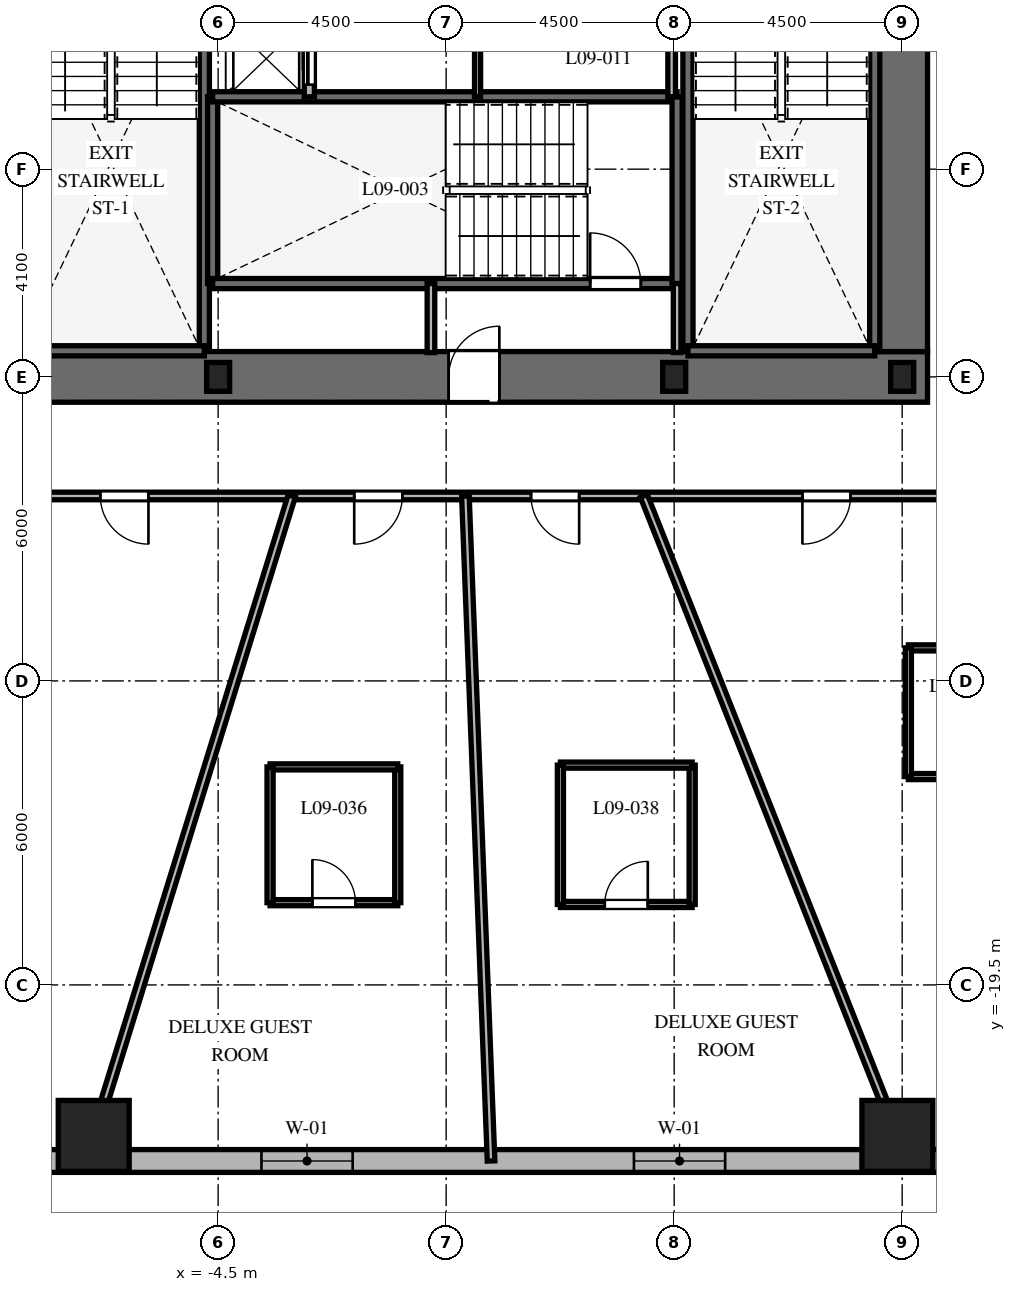
"""IFC4 building model, lengths in metres.
Left out: names, types, materials, properties, quantities, classifications, styles, units other than length and angle.
Written with IfcOpenShell. Run it as: python <this file> out.ifc"""

import sys

from ifc_helpers import new_model, si_unit, direction, frame, frame_2d, origin, origin_2d, place, context, subcontext, project, spatial, rectangle, i_section, extrude, element, fill, save


model = new_model("IFC4")
c1 = context("Model", 3, precision=1e-05, world=origin(), true_north=direction((0.0, 1.0)))
c2 = subcontext(c1, "Body", "Model", "MODEL_VIEW")
j1 = project(units=[si_unit("LENGTHUNIT", "METRE"), si_unit("PLANEANGLEUNIT", "RADIAN")], contexts=[c1])
p1 = place(None, origin())
s1 = spatial("IfcSite", under=j1, at=p1, CompositionType="ELEMENT")
p2 = place(p1, origin())
s2 = spatial("IfcBuilding", under=s1, at=p2, CompositionType="ELEMENT")
p3 = place(p2, frame((0.0, 0.0, 45.3)))
s3 = spatial("IfcBuildingStorey", under=s2, at=p3, CompositionType="ELEMENT", Elevation=45.3)
p4 = place(p3, frame((-9.5, -7.5, 0.0), z_axis=(0.0, 0.0, 1.0), x_axis=(1.0, 0.0, 0.0)))
e1 = element("IfcWall", 1, at=p4, inside=s3, PredefinedType="SHEAR", context=c2, shape_type="SweptSolid", body=[
    extrude(rectangle(XDim=19.0, YDim=1.0, at=frame_2d((9.5, 0.0))), origin(), (0.0, 0.0, 1.0), 3.7),
])
p5 = place(p4, frame((9.55, 0.0, 0.0)))
e2 = element("IfcOpeningElement", 2, at=p5, cuts=e1, PredefinedType="OPENING", context=c2, shape_type="SweptSolid", body=[
    extrude(rectangle(XDim=1.0, YDim=2.15, at=frame_2d((0.5, 1.075))), frame((0.0, 0.51, 0.0), z_axis=(0.0, -1.0, 0.0), x_axis=(1.0, 0.0, 0.0)), (0.0, 0.0, 1.0), 1.02),
])
p6 = place(p3, frame((9.0, -7.0, 0.0), z_axis=(0.0, 0.0, 1.0), x_axis=(0.0, 1.0, 0.0)))
e3 = element("IfcWall", 3, at=p6, inside=s3, PredefinedType="SHEAR", context=c2, shape_type="SweptSolid", body=[
    extrude(rectangle(XDim=14.0, YDim=1.0, at=frame_2d((7.0, 0.0))), origin(), (0.0, 0.0, 1.0), 3.7),
])
p7 = place(p6, frame((10.125, 0.0, 0.0)))
e4 = element("IfcOpeningElement", 4, at=p7, cuts=e3, PredefinedType="OPENING", context=c2, shape_type="SweptSolid", body=[
    extrude(rectangle(XDim=1.05, YDim=2.15, at=frame_2d((0.525, 1.075))), frame((0.0, 0.51, 0.0), z_axis=(0.0, -1.0, 0.0), x_axis=(1.0, 0.0, 0.0)), (0.0, 0.0, 1.0), 1.02),
])
p8 = place(p3, frame((-4.772, -6.985, 0.0), z_axis=(0.0, 0.0, 1.0), x_axis=(0.0, 1.0, 0.0)))
e5 = element("IfcWall", 5, at=p8, inside=s3, PredefinedType="SHEAR", context=c2, shape_type="SweptSolid", body=[
    extrude(rectangle(XDim=9.143, YDim=0.2, at=frame_2d((4.572, 0.0))), origin(), (0.0, 0.0, 1.0), 3.7),
])
p9 = place(p3, frame((-8.458, -6.985, 0.0), z_axis=(0.0, 0.0, 1.0), x_axis=(1.0, 0.0, 0.0)))
e6 = element("IfcWall", 6, at=p9, inside=s3, PredefinedType="SHEAR", context=c2, shape_type="SweptSolid", body=[
    extrude(rectangle(XDim=3.686, YDim=0.2, at=frame_2d((1.843, 0.0))), origin(), (0.0, 0.0, 1.0), 3.7),
])
for number, where, z_axis, x_axis in (
    (7, (4.772, -6.985, 0.0), (0.0, 0.0, 1.0), (0.0, 1.0, 0.0)),
    (8, (8.458, -6.985, 0.0), (0.0, 0.0, 1.0), (0.0, 1.0, 0.0)),
):
    element("IfcWall", number, at=place(p3, frame(where, z_axis=z_axis, x_axis=x_axis)), inside=s3, PredefinedType="SHEAR", context=c2, shape_type="SweptSolid", body=[
        extrude(rectangle(XDim=9.143, YDim=0.2, at=frame_2d((4.572, 0.0))), origin(), (0.0, 0.0, 1.0), 3.7),
    ])
for number, where, z_axis, x_axis in (
    (9, (4.772, -6.985, 0.0), (0.0, 0.0, 1.0), (1.0, 0.0, 0.0)),
    (10, (-4.608, -5.658, 0.0), (0.0, 0.0, 1.0), (0.0, 1.0, 0.0)),
):
    element("IfcWall", number, at=place(p3, frame(where, z_axis=z_axis, x_axis=x_axis)), inside=s3, PredefinedType="SHEAR", context=c2, shape_type="SweptSolid", body=[
        extrude(rectangle(XDim=3.686, YDim=0.2, at=frame_2d((1.843, 0.0))), origin(), (0.0, 0.0, 1.0), 3.7),
    ])
p10 = place(p3, frame((-4.608, -5.658, 0.0), z_axis=(0.0, 0.0, 1.0), x_axis=(1.0, 0.0, 0.0)))
e11 = element("IfcWall", 11, at=p10, inside=s3, PredefinedType="SHEAR", context=c2, shape_type="SweptSolid", body=[
    extrude(rectangle(XDim=9.166, YDim=0.2, at=frame_2d((4.583, 0.0))), origin(), (0.0, 0.0, 1.0), 3.7),
])
p11 = place(p10, frame((7.45, 0.0, 0.0)))
e12 = element("IfcOpeningElement", 12, at=p11, cuts=e11, PredefinedType="OPENING", context=c2, shape_type="SweptSolid", body=[
    extrude(rectangle(XDim=1.0, YDim=2.15, at=frame_2d((0.5, 1.075))), frame((0.0, 0.11, 0.0), z_axis=(0.0, -1.0, 0.0), x_axis=(1.0, 0.0, 0.0)), (0.0, 0.0, 1.0), 0.22),
])
p12 = place(p3, frame((-4.608, -1.972, 0.0), z_axis=(0.0, 0.0, 1.0), x_axis=(1.0, 0.0, 0.0)))
e13 = element("IfcWall", 13, at=p12, inside=s3, PredefinedType="SHEAR", context=c2, shape_type="SweptSolid", body=[
    extrude(rectangle(XDim=9.166, YDim=0.2, at=frame_2d((4.583, 0.0))), origin(), (0.0, 0.0, 1.0), 3.7),
])
p13 = place(p3, frame((4.558, -5.658, 0.0), z_axis=(0.0, 0.0, 1.0), x_axis=(0.0, 1.0, 0.0)))
e14 = element("IfcWall", 14, at=p13, inside=s3, PredefinedType="SHEAR", context=c2, shape_type="SweptSolid", body=[
    extrude(rectangle(XDim=3.686, YDim=0.2, at=frame_2d((1.843, 0.0))), origin(), (0.0, 0.0, 1.0), 3.7),
])
for number, where, z_axis, x_axis in (
    (15, (-4.5, -7.5, 0.0), (0.0, 0.0, 1.0), (1.0, 0.0, 0.0)),
    (16, (4.5, -7.5, 0.0), (0.0, 0.0, 1.0), (1.0, 0.0, 0.0)),
    (17, (9.0, -7.5, 0.0), (0.0, 0.0, 1.0), (1.0, 0.0, 0.0)),
):
    element("IfcColumn", number, at=place(p3, frame(where, z_axis=z_axis, x_axis=x_axis)), inside=s3, PredefinedType="COLUMN", context=c2, shape_type="SweptSolid", body=[
        extrude(i_section(OverallWidth=0.454, OverallDepth=0.569, WebThickness=0.078, FlangeThickness=0.125, at=origin_2d()), origin(), (0.0, 0.0, 1.0), 3.7),
    ])
for number, where, z_axis, x_axis in (
    (18, (-6.955, -22.48, 0.0), (0.0, 0.0, 1.0), (1.0, 0.0, 0.0)),
    (19, (8.905, -22.48, 0.0), (0.0, 0.0, 1.0), (1.0, 0.0, 0.0)),
):
    element("IfcColumn", number, at=place(p3, frame(where, z_axis=z_axis, x_axis=x_axis)), inside=s3, PredefinedType="COLUMN", context=c2, shape_type="SweptSolid", body=[
        extrude(rectangle(XDim=1.4, YDim=1.4, at=origin_2d()), origin(), (0.0, 0.0, 1.0), 3.7),
    ])
p14 = place(p3, frame((-12.221, -22.975, 0.0), z_axis=(0.0, 0.0, 1.0), x_axis=(1.0, 0.0, 0.0)))
e20 = element("IfcWall", 20, at=p14, inside=s3, PredefinedType="SOLIDWALL", context=c2, shape_type="SweptSolid", body=[
    extrude(rectangle(XDim=26.389, YDim=0.45, at=frame_2d((13.195, 0.0))), origin(), (0.0, 0.0, 1.0), 3.4),
])
p15 = place(p14, frame((1.653, 0.0, 0.8)))
e21 = element("IfcOpeningElement", 21, at=p15, cuts=e20, PredefinedType="OPENING", context=c2, shape_type="SweptSolid", body=[
    extrude(rectangle(XDim=1.8, YDim=1.8, at=frame_2d((0.9, 0.9))), frame((0.0, 0.235, 0.0), z_axis=(0.0, -1.0, 0.0), x_axis=(1.0, 0.0, 0.0)), (0.0, 0.0, 1.0), 0.47),
])
p16 = place(p14, frame((8.576, 0.0, 0.8)))
e22 = element("IfcOpeningElement", 22, at=p16, cuts=e20, PredefinedType="OPENING", context=c2, shape_type="SweptSolid", body=[
    extrude(rectangle(XDim=1.8, YDim=1.8, at=frame_2d((0.9, 0.9))), frame((0.0, 0.235, 0.0), z_axis=(0.0, -1.0, 0.0), x_axis=(1.0, 0.0, 0.0)), (0.0, 0.0, 1.0), 0.47),
])
p17 = place(p14, frame((15.927, 0.0, 0.8)))
e23 = element("IfcOpeningElement", 23, at=p17, cuts=e20, PredefinedType="OPENING", context=c2, shape_type="SweptSolid", body=[
    extrude(rectangle(XDim=1.8, YDim=1.8, at=frame_2d((0.9, 0.9))), frame((0.0, 0.235, 0.0), z_axis=(0.0, -1.0, 0.0), x_axis=(1.0, 0.0, 0.0)), (0.0, 0.0, 1.0), 0.47),
])
p18 = place(p14, frame((22.938, 0.0, 0.8)))
e24 = element("IfcOpeningElement", 24, at=p18, cuts=e20, PredefinedType="OPENING", context=c2, shape_type="SweptSolid", body=[
    extrude(rectangle(XDim=1.8, YDim=1.8, at=frame_2d((0.9, 0.9))), frame((0.0, 0.235, 0.0), z_axis=(0.0, -1.0, 0.0), x_axis=(1.0, 0.0, 0.0)), (0.0, 0.0, 1.0), 0.47),
])
for number, where, z_axis, x_axis in (
    (25, (-0.3, -7.02, 0.0), (0.0, 0.0, 1.0), (0.0, 1.0, 0.0)),
    (26, (4.558, -7.02, 0.0), (0.0, 0.0, 1.0), (0.0, 1.0, 0.0)),
):
    element("IfcWall", number, at=place(p3, frame(where, z_axis=z_axis, x_axis=x_axis)), inside=s3, PredefinedType="PARTITIONING", context=c2, shape_type="SweptSolid", body=[
        extrude(rectangle(XDim=1.362, YDim=0.15, at=frame_2d((0.681, 0.0))), origin(), (0.0, 0.0, 1.0), 3.4),
    ])
p19 = place(p3, frame((-2.7, -1.972, 0.0), z_axis=(0.0, 0.0, 1.0), x_axis=(0.0, 1.0, 0.0)))
e27 = element("IfcWall", 27, at=p19, inside=s3, PredefinedType="PARTITIONING", context=c2, shape_type="SweptSolid", body=[
    extrude(rectangle(XDim=1.472, YDim=0.2, at=frame_2d((0.736, 0.0))), origin(), (0.0, 0.0, 1.0), 3.4),
])
p20 = place(p19, frame((0.24, 0.0, 0.0)))
e28 = element("IfcOpeningElement", 28, at=p20, cuts=e27, PredefinedType="OPENING", context=c2, shape_type="SweptSolid", body=[
    extrude(rectangle(XDim=1.0, YDim=2.2, at=frame_2d((0.5, 1.1))), frame((0.0, 0.11, 0.0), z_axis=(0.0, -1.0, 0.0), x_axis=(1.0, 0.0, 0.0)), (0.0, 0.0, 1.0), 0.22),
])
p21 = place(p3, frame((4.45, -1.972, 0.0), z_axis=(0.0, 0.0, 1.0), x_axis=(0.0, 1.0, 0.0)))
e29 = element("IfcWall", 29, at=p21, inside=s3, PredefinedType="PARTITIONING", context=c2, shape_type="SweptSolid", body=[
    extrude(rectangle(XDim=4.222, YDim=0.15, at=frame_2d((2.111, 0.0))), origin(), (0.0, 0.0, 1.0), 3.4),
])
p22 = place(p3, frame((0.62, -1.972, 0.0), z_axis=(0.0, 0.0, 1.0), x_axis=(0.0, 1.0, 0.0)))
e30 = element("IfcWall", 30, at=p22, inside=s3, PredefinedType="PARTITIONING", context=c2, shape_type="SweptSolid", body=[
    extrude(rectangle(XDim=1.472, YDim=0.12, at=frame_2d((0.736, 0.0))), origin(), (0.0, 0.0, 1.0), 3.4),
])
p23 = place(p3, frame((11.35, -9.85, 0.0), z_axis=(0.0, 0.0, 1.0), x_axis=(-1.0, 0.0, 0.0)))
e31 = element("IfcWall", 31, at=p23, inside=s3, PredefinedType="PARTITIONING", context=c2, shape_type="SweptSolid", body=[
    extrude(rectangle(XDim=22.7, YDim=0.15, at=frame_2d((11.35, 0.0))), origin(), (0.0, 0.0, 1.0), 2.84),
])
p24 = place(p23, frame((17.225, 0.0, 0.0)))
e32 = element("IfcOpeningElement", 32, at=p24, cuts=e31, PredefinedType="OPENING", context=c2, shape_type="SweptSolid", body=[
    extrude(rectangle(XDim=0.95, YDim=2.03, at=frame_2d((0.475, 1.015))), frame((0.0, 0.085, 0.0), z_axis=(0.0, -1.0, 0.0), x_axis=(1.0, 0.0, 0.0)), (0.0, 0.0, 1.0), 0.17),
])
p25 = place(p23, frame((12.214, 0.0, 0.0)))
e33 = element("IfcOpeningElement", 33, at=p25, cuts=e31, PredefinedType="OPENING", context=c2, shape_type="SweptSolid", body=[
    extrude(rectangle(XDim=0.95, YDim=2.03, at=frame_2d((0.475, 1.015))), frame((0.0, 0.085, 0.0), z_axis=(0.0, -1.0, 0.0), x_axis=(1.0, 0.0, 0.0)), (0.0, 0.0, 1.0), 0.17),
])
p26 = place(p23, frame((8.725, 0.0, 0.0)))
e34 = element("IfcOpeningElement", 34, at=p26, cuts=e31, PredefinedType="OPENING", context=c2, shape_type="SweptSolid", body=[
    extrude(rectangle(XDim=0.95, YDim=2.03, at=frame_2d((0.475, 1.015))), frame((0.0, 0.085, 0.0), z_axis=(0.0, -1.0, 0.0), x_axis=(1.0, 0.0, 0.0)), (0.0, 0.0, 1.0), 0.17),
])
p27 = place(p23, frame((3.369, 0.0, 0.0)))
e35 = element("IfcOpeningElement", 35, at=p27, cuts=e31, PredefinedType="OPENING", context=c2, shape_type="SweptSolid", body=[
    extrude(rectangle(XDim=0.95, YDim=2.03, at=frame_2d((0.475, 1.015))), frame((0.0, 0.085, 0.0), z_axis=(0.0, -1.0, 0.0), x_axis=(1.0, 0.0, 0.0)), (0.0, 0.0, 1.0), 0.17),
])
p28 = place(p3, frame((-3.048, -9.85, 0.0), z_axis=(0.0, 0.0, 1.0), x_axis=(-0.295553992761, -0.955326037206, 0.0)))
e36 = element("IfcWall", 36, at=p28, inside=s3, PredefinedType="PARTITIONING", context=c2, shape_type="SweptSolid", body=[
    extrude(rectangle(XDim=13.739, YDim=0.15, at=frame_2d((6.869, 0.0))), origin(), (0.0, 0.0, 1.0), 2.54),
])
p29 = place(p3, frame((0.38, -9.85, 0.0), z_axis=(0.0, 0.0, 1.0), x_axis=(0.038568751747, -0.999255948888, 0.0)))
e37 = element("IfcWall", 37, at=p29, inside=s3, PredefinedType="PARTITIONING", context=c2, shape_type="SweptSolid", body=[
    extrude(rectangle(XDim=13.135, YDim=0.15, at=frame_2d((6.567, 0.0))), origin(), (0.0, 0.0, 1.0), 2.54),
])
p30 = place(p3, frame((3.902, -9.85, 0.0), z_axis=(0.0, 0.0, 1.0), x_axis=(0.36828765711, -0.929711891728, 0.0)))
e38 = element("IfcWall", 38, at=p30, inside=s3, PredefinedType="PARTITIONING", context=c2, shape_type="SweptSolid", body=[
    extrude(rectangle(XDim=14.117, YDim=0.15, at=frame_2d((7.059, 0.0))), origin(), (0.0, 0.0, 1.0), 2.54),
])
p31 = place(p3, frame((-3.475, -17.877, 0.0), z_axis=(0.0, 0.0, 1.0), x_axis=(1.0, 0.0, 0.0)))
e39 = element("IfcWall", 39, at=p31, inside=s3, PredefinedType="PARTITIONING", context=c2, shape_type="SweptSolid", body=[
    extrude(rectangle(XDim=2.52, YDim=0.12, at=frame_2d((1.26, 0.0))), origin(), (0.0, 0.0, 1.0), 2.84),
])
p32 = place(p31, frame((0.835, 0.0, 0.0)))
e40 = element("IfcOpeningElement", 40, at=p32, cuts=e39, PredefinedType="OPENING", context=c2, shape_type="SweptSolid", body=[
    extrude(rectangle(XDim=0.85, YDim=2.03, at=frame_2d((0.425, 1.015))), frame((0.0, 0.07, 0.0), z_axis=(0.0, -1.0, 0.0), x_axis=(1.0, 0.0, 0.0)), (0.0, 0.0, 1.0), 0.14),
])
p33 = place(p3, frame((-0.955, -17.877, 0.0), z_axis=(0.0, 0.0, 1.0), x_axis=(0.0, 1.0, 0.0)))
e41 = element("IfcWall", 41, at=p33, inside=s3, PredefinedType="PARTITIONING", context=c2, shape_type="SweptSolid", body=[
    extrude(rectangle(XDim=2.68, YDim=0.12, at=frame_2d((1.34, 0.0))), origin(), (0.0, 0.0, 1.0), 2.84),
])
p34 = place(p3, frame((-0.955, -15.197, 0.0), z_axis=(0.0, 0.0, 1.0), x_axis=(-1.0, 0.0, 0.0)))
e42 = element("IfcWall", 42, at=p34, inside=s3, PredefinedType="PARTITIONING", context=c2, shape_type="SweptSolid", body=[
    extrude(rectangle(XDim=2.52, YDim=0.12, at=frame_2d((1.26, 0.0))), origin(), (0.0, 0.0, 1.0), 3.4),
])
p35 = place(p3, frame((-3.475, -15.197, 0.0), z_axis=(0.0, 0.0, 1.0), x_axis=(0.0, -1.0, 0.0)))
e43 = element("IfcWall", 43, at=p35, inside=s3, PredefinedType="PARTITIONING", context=c2, shape_type="SweptSolid", body=[
    extrude(rectangle(XDim=2.68, YDim=0.12, at=frame_2d((1.34, 0.0))), origin(), (0.0, 0.0, 1.0), 2.84),
])
p36 = place(p3, frame((2.255, -17.912, 0.0), z_axis=(0.0, 0.0, 1.0), x_axis=(1.0, 0.0, 0.0)))
e44 = element("IfcWall", 44, at=p36, inside=s3, PredefinedType="PARTITIONING", context=c2, shape_type="SweptSolid", body=[
    extrude(rectangle(XDim=2.6, YDim=0.12, at=frame_2d((1.3, 0.0))), origin(), (0.0, 0.0, 1.0), 3.4),
])
p37 = place(p36, frame((0.875, 0.0, 0.0)))
e45 = element("IfcOpeningElement", 45, at=p37, cuts=e44, PredefinedType="OPENING", context=c2, shape_type="SweptSolid", body=[
    extrude(rectangle(XDim=0.85, YDim=2.03, at=frame_2d((0.425, 1.015))), frame((0.0, 0.07, 0.0), z_axis=(0.0, -1.0, 0.0), x_axis=(1.0, 0.0, 0.0)), (0.0, 0.0, 1.0), 0.14),
])
p38 = place(p3, frame((4.855, -17.912, 0.0), z_axis=(0.0, 0.0, 1.0), x_axis=(0.0, 1.0, 0.0)))
e46 = element("IfcWall", 46, at=p38, inside=s3, PredefinedType="PARTITIONING", context=c2, shape_type="SweptSolid", body=[
    extrude(rectangle(XDim=2.75, YDim=0.12, at=frame_2d((1.375, 0.0))), origin(), (0.0, 0.0, 1.0), 2.84),
])
p39 = place(p3, frame((4.855, -15.162, 0.0), z_axis=(0.0, 0.0, 1.0), x_axis=(-1.0, 0.0, 0.0)))
e47 = element("IfcWall", 47, at=p39, inside=s3, PredefinedType="PARTITIONING", context=c2, shape_type="SweptSolid", body=[
    extrude(rectangle(XDim=2.6, YDim=0.12, at=frame_2d((1.3, 0.0))), origin(), (0.0, 0.0, 1.0), 3.4),
])
p40 = place(p3, frame((2.255, -15.162, 0.0), z_axis=(0.0, 0.0, 1.0), x_axis=(0.0, -1.0, 0.0)))
e48 = element("IfcWall", 48, at=p40, inside=s3, PredefinedType="PARTITIONING", context=c2, shape_type="SweptSolid", body=[
    extrude(rectangle(XDim=2.75, YDim=0.12, at=frame_2d((1.375, 0.0))), origin(), (0.0, 0.0, 1.0), 2.84),
])
p41 = place(p3, frame((9.122, -15.388, 0.0), z_axis=(0.0, 0.0, 1.0), x_axis=(1.0, 0.0, 0.0)))
e49 = element("IfcWall", 49, at=p41, inside=s3, PredefinedType="PARTITIONING", context=c2, shape_type="SweptSolid", body=[
    extrude(rectangle(XDim=2.68, YDim=0.12, at=frame_2d((1.34, 0.0))), origin(), (0.0, 0.0, 1.0), 3.4),
])
p42 = place(p41, frame((0.915, 0.0, 0.0)))
e50 = element("IfcOpeningElement", 50, at=p42, cuts=e49, PredefinedType="OPENING", context=c2, shape_type="SweptSolid", body=[
    extrude(rectangle(XDim=0.85, YDim=2.03, at=frame_2d((0.425, 1.015))), frame((0.0, 0.07, 0.0), z_axis=(0.0, -1.0, 0.0), x_axis=(1.0, 0.0, 0.0)), (0.0, 0.0, 1.0), 0.14),
])
p43 = place(p3, frame((11.802, -12.848, 0.0), z_axis=(0.0, 0.0, 1.0), x_axis=(-1.0, 0.0, 0.0)))
e51 = element("IfcWall", 51, at=p43, inside=s3, PredefinedType="PARTITIONING", context=c2, shape_type="SweptSolid", body=[
    extrude(rectangle(XDim=2.68, YDim=0.12, at=frame_2d((1.34, 0.0))), origin(), (0.0, 0.0, 1.0), 2.972),
])
p44 = place(p3, frame((9.122, -12.848, 0.0), z_axis=(0.0, 0.0, 1.0), x_axis=(0.0, -1.0, 0.0)))
e52 = element("IfcWall", 52, at=p44, inside=s3, PredefinedType="PARTITIONING", context=c2, shape_type="SweptSolid", body=[
    extrude(rectangle(XDim=2.54, YDim=0.12, at=frame_2d((1.27, 0.0))), origin(), (0.0, 0.0, 1.0), 2.84),
])
p45 = place(p16, origin())
e53 = element("IfcWindow", 53, at=p45, inside=s3, PartitioningType="SINGLE_PANEL", PredefinedType="WINDOW", context=c2, shape_type="SweptSolid", body=[
    extrude(rectangle(XDim=1.8, YDim=1.8, at=frame_2d((0.9, 0.9))), frame((0.0, 0.03, 0.0), z_axis=(0.0, -1.0, 0.0), x_axis=(1.0, 0.0, 0.0)), (0.0, 0.0, 1.0), 0.06),
])
fill(e22, e53)
p46 = place(p17, origin())
e54 = element("IfcWindow", 54, at=p46, inside=s3, PartitioningType="SINGLE_PANEL", PredefinedType="WINDOW", context=c2, shape_type="SweptSolid", body=[
    extrude(rectangle(XDim=1.8, YDim=1.8, at=frame_2d((0.9, 0.9))), frame((0.0, 0.03, 0.0), z_axis=(0.0, -1.0, 0.0), x_axis=(1.0, 0.0, 0.0)), (0.0, 0.0, 1.0), 0.06),
])
fill(e23, e54)
p47 = place(p11, origin())
e55 = element("IfcDoor", 55, at=p47, inside=s3, OperationType="SINGLE_SWING_LEFT", PredefinedType="DOOR", context=c2, shape_type="SweptSolid", body=[
    extrude(rectangle(XDim=1.0, YDim=2.15, at=frame_2d((0.5, 1.075))), frame((0.0, 0.025, 0.0), z_axis=(0.0, -1.0, 0.0), x_axis=(1.0, 0.0, 0.0)), (0.0, 0.0, 1.0), 0.05),
])
fill(e12, e55)
p48 = place(p5, origin())
e56 = element("IfcDoor", 56, at=p48, inside=s3, OperationType="SINGLE_SWING_RIGHT", PredefinedType="DOOR", context=c2, shape_type="SweptSolid", body=[
    extrude(rectangle(XDim=1.0, YDim=2.15, at=frame_2d((0.5, 1.075))), frame((0.0, 0.025, 0.0), z_axis=(0.0, -1.0, 0.0), x_axis=(1.0, 0.0, 0.0)), (0.0, 0.0, 1.0), 0.05),
])
fill(e2, e56)
p49 = place(p20, origin())
e57 = element("IfcDoor", 57, at=p49, inside=s3, OperationType="SLIDING_TO_LEFT", PredefinedType="DOOR", context=c2, shape_type="SweptSolid", body=[
    extrude(rectangle(XDim=1.0, YDim=2.2, at=frame_2d((0.5, 1.1))), frame((0.0, 0.025, 0.0), z_axis=(0.0, -1.0, 0.0), x_axis=(1.0, 0.0, 0.0)), (0.0, 0.0, 1.0), 0.05),
])
fill(e28, e57)
p50 = place(p24, origin())
e58 = element("IfcDoor", 58, at=p50, inside=s3, OperationType="SINGLE_SWING_LEFT", PredefinedType="DOOR", context=c2, shape_type="SweptSolid", body=[
    extrude(rectangle(XDim=0.95, YDim=2.03, at=frame_2d((0.475, 1.015))), frame((0.0, 0.025, 0.0), z_axis=(0.0, -1.0, 0.0), x_axis=(1.0, 0.0, 0.0)), (0.0, 0.0, 1.0), 0.05),
])
fill(e32, e58)
p51 = place(p25, origin())
e59 = element("IfcDoor", 59, at=p51, inside=s3, OperationType="SINGLE_SWING_RIGHT", PredefinedType="DOOR", context=c2, shape_type="SweptSolid", body=[
    extrude(rectangle(XDim=0.95, YDim=2.03, at=frame_2d((0.475, 1.015))), frame((0.0, 0.025, 0.0), z_axis=(0.0, -1.0, 0.0), x_axis=(1.0, 0.0, 0.0)), (0.0, 0.0, 1.0), 0.05),
])
fill(e33, e59)
p52 = place(p32, origin())
e60 = element("IfcDoor", 60, at=p52, inside=s3, OperationType="SINGLE_SWING_LEFT", PredefinedType="DOOR", context=c2, shape_type="SweptSolid", body=[
    extrude(rectangle(XDim=0.85, YDim=2.03, at=frame_2d((0.425, 1.015))), frame((0.0, 0.025, 0.0), z_axis=(0.0, -1.0, 0.0), x_axis=(1.0, 0.0, 0.0)), (0.0, 0.0, 1.0), 0.05),
])
fill(e40, e60)
p53 = place(p26, origin())
e61 = element("IfcDoor", 61, at=p53, inside=s3, OperationType="SINGLE_SWING_LEFT", PredefinedType="DOOR", context=c2, shape_type="SweptSolid", body=[
    extrude(rectangle(XDim=0.95, YDim=2.03, at=frame_2d((0.475, 1.015))), frame((0.0, 0.025, 0.0), z_axis=(0.0, -1.0, 0.0), x_axis=(1.0, 0.0, 0.0)), (0.0, 0.0, 1.0), 0.05),
])
fill(e34, e61)
p54 = place(p37, origin())
e62 = element("IfcDoor", 62, at=p54, inside=s3, OperationType="SINGLE_SWING_RIGHT", PredefinedType="DOOR", context=c2, shape_type="SweptSolid", body=[
    extrude(rectangle(XDim=0.85, YDim=2.03, at=frame_2d((0.425, 1.015))), frame((0.0, 0.025, 0.0), z_axis=(0.0, -1.0, 0.0), x_axis=(1.0, 0.0, 0.0)), (0.0, 0.0, 1.0), 0.05),
])
fill(e45, e62)
p55 = place(p27, origin())
e63 = element("IfcDoor", 63, at=p55, inside=s3, OperationType="SINGLE_SWING_RIGHT", PredefinedType="DOOR", context=c2, shape_type="SweptSolid", body=[
    extrude(rectangle(XDim=0.95, YDim=2.03, at=frame_2d((0.475, 1.015))), frame((0.0, 0.025, 0.0), z_axis=(0.0, -1.0, 0.0), x_axis=(1.0, 0.0, 0.0)), (0.0, 0.0, 1.0), 0.05),
])
fill(e35, e63)
save(model, sys.argv[1])
